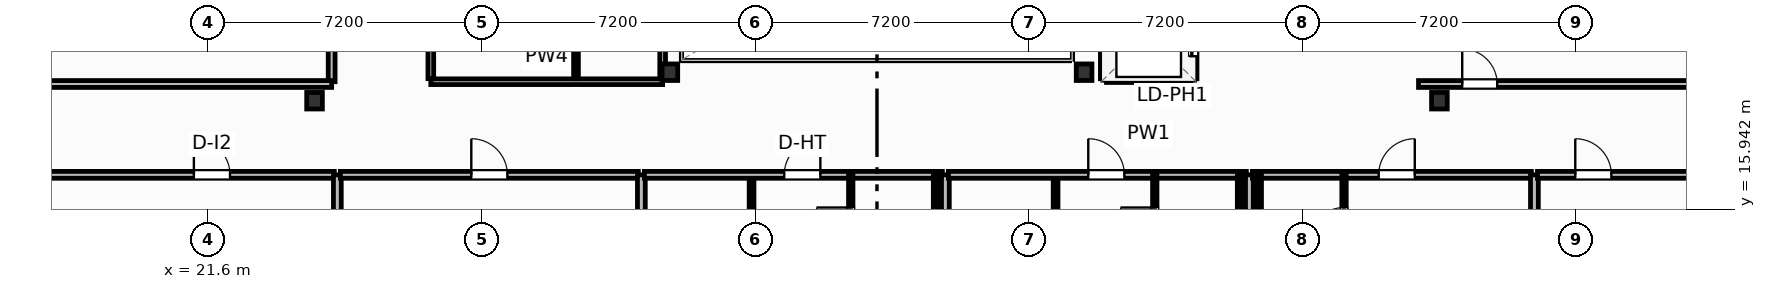
"""IFC4 building model, lengths in metres.
Left out: names, types, materials, properties, quantities, classifications, styles, units other than length and angle.
Written with IfcOpenShell. Run it as: python <this file> out.ifc"""

import sys

from ifc_helpers import new_model, si_unit, direction, frame, frame_2d, origin, origin_2d, place, context, subcontext, project, spatial, rectangle, i_section, extrude, element, fill, save


model = new_model("IFC4")
c1 = context("Model", 3, precision=1e-05, world=origin(), true_north=direction((0.0, 1.0)))
c2 = subcontext(c1, "Body", "Model", "MODEL_VIEW")
j1 = project(units=[si_unit("LENGTHUNIT", "METRE"), si_unit("PLANEANGLEUNIT", "RADIAN")], contexts=[c1])
p1 = place(None, origin())
s1 = spatial("IfcSite", under=j1, at=p1, CompositionType="ELEMENT")
p2 = place(p1, origin())
s2 = spatial("IfcBuilding", under=s1, at=p2, CompositionType="ELEMENT")
p3 = place(p2, frame((0.0, 0.0, 242.3)))
s3 = spatial("IfcBuildingStorey", under=s2, at=p3, CompositionType="ELEMENT", Elevation=242.3)
for number, where, z_axis, x_axis in (
    (1, (33.75, 19.55, 0.0), (0.0, 0.0, 1.0), (1.0, 0.0, 0.0)),
    (2, (44.65, 19.55, 0.0), (0.0, 0.0, 1.0), (1.0, 0.0, 0.0)),
    (3, (24.4, 18.8, 0.0), (0.0, 0.0, 1.0), (1.0, 0.0, 0.0)),
    (4, (54.0, 18.8, 0.0), (0.0, 0.0, 1.0), (1.0, 0.0, 0.0)),
):
    element("IfcColumn", number, at=place(p3, frame(where, z_axis=z_axis, x_axis=x_axis)), inside=s3, PredefinedType="COLUMN", context=c2, shape_type="SweptSolid", body=[
        extrude(i_section(OverallWidth=0.412, OverallDepth=0.435, WebThickness=0.036, FlangeThickness=0.057, FilletRadius=0.025, at=origin_2d()), origin(), (0.0, 0.0, 1.0), 3.7),
    ])
p4 = place(p3, frame((56.219, 9.845, 0.0), z_axis=(0.0, 0.0, 1.0), x_axis=(0.935225601791, 0.354052360188, 0.0)))
e5 = element("IfcWall", 5, at=p4, inside=s3, PredefinedType="SOLIDWALL", context=c2, shape_type="SweptSolid", body=[
    extrude(rectangle(XDim=17.647, YDim=0.22, at=frame_2d((8.824, 0.0))), origin(), (0.0, 0.0, 1.0), 2.73),
])
p5 = place(p4, frame((7.774, 0.0, 0.8)))
e6 = element("IfcOpeningElement", 6, at=p5, cuts=e5, PredefinedType="OPENING", context=c2, shape_type="SweptSolid", body=[
    extrude(rectangle(XDim=2.1, YDim=1.75, at=frame_2d((1.05, 0.875))), frame((0.0, 0.12, 0.0), z_axis=(0.0, -1.0, 0.0), x_axis=(1.0, 0.0, 0.0)), (0.0, 0.0, 1.0), 0.24),
])
p6 = place(p3, frame((7.196, 16.85, 0.0), z_axis=(0.0, 0.0, 1.0), x_axis=(1.0, 0.0, 0.0)))
e7 = element("IfcWall", 7, at=p6, inside=s3, PredefinedType="PARTITIONING", context=c2, shape_type="SweptSolid", body=[
    extrude(rectangle(XDim=17.724, YDim=0.18, at=frame_2d((8.862, 0.0))), origin(), (0.0, 0.0, 1.0), 3.45),
])
p7 = place(p6, frame((14.029, 0.0, 0.0)))
e8 = element("IfcOpeningElement", 8, at=p7, cuts=e7, PredefinedType="OPENING", context=c2, shape_type="SweptSolid", body=[
    extrude(rectangle(XDim=0.95, YDim=2.05, at=frame_2d((0.475, 1.025))), frame((0.0, 0.1, 0.0), z_axis=(0.0, -1.0, 0.0), x_axis=(1.0, 0.0, 0.0)), (0.0, 0.0, 1.0), 0.2),
])
p8 = place(p3, frame((25.0, -1.953, 0.0), z_axis=(0.0, 0.0, 1.0), x_axis=(0.0, 1.0, 0.0)))
e9 = element("IfcWall", 9, at=p8, inside=s3, PredefinedType="PARTITIONING", context=c2, shape_type="SweptSolid", body=[
    extrude(rectangle(XDim=18.803, YDim=0.205, at=frame_2d((9.402, 0.0))), origin(), (0.0, 0.0, 1.0), 2.739),
])
p9 = place(p3, frame((25.08, 16.85, 0.0), z_axis=(0.0, 0.0, 1.0), x_axis=(1.0, 0.0, 0.0)))
e10 = element("IfcWall", 10, at=p9, inside=s3, PredefinedType="PARTITIONING", context=c2, shape_type="SweptSolid", body=[
    extrude(rectangle(XDim=7.84, YDim=0.18, at=frame_2d((3.92, 0.0))), origin(), (0.0, 0.0, 1.0), 3.45),
])
p10 = place(p9, frame((3.445, 0.0, 0.0)))
e11 = element("IfcOpeningElement", 11, at=p10, cuts=e10, PredefinedType="OPENING", context=c2, shape_type="SweptSolid", body=[
    extrude(rectangle(XDim=0.95, YDim=2.05, at=frame_2d((0.475, 1.025))), frame((0.0, 0.1, 0.0), z_axis=(0.0, -1.0, 0.0), x_axis=(1.0, 0.0, 0.0)), (0.0, 0.0, 1.0), 0.2),
])
p11 = place(p3, frame((33.0, 1.076, 0.0), z_axis=(0.0, 0.0, 1.0), x_axis=(0.0, 1.0, 0.0)))
e12 = element("IfcWall", 12, at=p11, inside=s3, PredefinedType="PARTITIONING", context=c2, shape_type="SweptSolid", body=[
    extrude(rectangle(XDim=15.774, YDim=0.205, at=frame_2d((7.887, 0.0))), origin(), (0.0, 0.0, 1.0), 3.45),
])
p12 = place(p3, frame((35.9, 2.174, 0.0), z_axis=(0.0, 0.0, 1.0), x_axis=(0.0, 1.0, 0.0)))
e13 = element("IfcWall", 13, at=p12, inside=s3, PredefinedType="PARTITIONING", context=c2, shape_type="SweptSolid", body=[
    extrude(rectangle(XDim=14.677, YDim=0.125, at=frame_2d((7.338, 0.0))), origin(), (0.0, 0.0, 1.0), 2.739),
])
p13 = place(p12, frame((3.752, 0.0, 0.0)))
e14 = element("IfcOpeningElement", 14, at=p13, cuts=e13, PredefinedType="OPENING", context=c2, shape_type="SweptSolid", body=[
    extrude(rectangle(XDim=0.92, YDim=2.05, at=frame_2d((0.46, 1.025))), frame((0.0, 0.073, 0.0), z_axis=(0.0, -1.0, 0.0), x_axis=(1.0, 0.0, 0.0)), (0.0, 0.0, 1.0), 0.145),
])
p14 = place(p3, frame((33.08, 16.85, 0.0), z_axis=(0.0, 0.0, 1.0), x_axis=(1.0, 0.0, 0.0)))
e15 = element("IfcWall", 15, at=p14, inside=s3, PredefinedType="PARTITIONING", context=c2, shape_type="SweptSolid", body=[
    extrude(rectangle(XDim=7.84, YDim=0.18, at=frame_2d((3.92, 0.0))), origin(), (0.0, 0.0, 1.0), 3.45),
])
p15 = place(p14, frame((3.68, 0.0, 0.0)))
e16 = element("IfcOpeningElement", 16, at=p15, cuts=e15, PredefinedType="OPENING", context=c2, shape_type="SweptSolid", body=[
    extrude(rectangle(XDim=0.95, YDim=2.15, at=frame_2d((0.475, 1.075))), frame((0.0, 0.1, 0.0), z_axis=(0.0, -1.0, 0.0), x_axis=(1.0, 0.0, 0.0)), (0.0, 0.0, 1.0), 0.2),
])
p16 = place(p3, frame((38.51, 14.33, 0.0), z_axis=(0.0, 0.0, 1.0), x_axis=(0.0, 1.0, 0.0)))
e17 = element("IfcWall", 17, at=p16, inside=s3, PredefinedType="PARTITIONING", context=c2, shape_type="SweptSolid", body=[
    extrude(rectangle(XDim=2.52, YDim=0.115, at=frame_2d((1.26, 0.0))), origin(), (0.0, 0.0, 1.0), 3.45),
])
p17 = place(p16, frame((0.76, 0.0, 0.0)))
e18 = element("IfcOpeningElement", 18, at=p17, cuts=e17, PredefinedType="OPENING", context=c2, shape_type="SweptSolid", body=[
    extrude(rectangle(XDim=0.9, YDim=2.05, at=frame_2d((0.45, 1.025))), frame((0.0, 0.067, 0.0), z_axis=(0.0, -1.0, 0.0), x_axis=(1.0, 0.0, 0.0)), (0.0, 0.0, 1.0), 0.135),
])
p18 = place(p3, frame((40.74, 14.33, 0.0), z_axis=(0.0, 0.0, 1.0), x_axis=(0.0, 1.0, 0.0)))
e19 = element("IfcWall", 19, at=p18, inside=s3, PredefinedType="PARTITIONING", context=c2, shape_type="SweptSolid", body=[
    extrude(rectangle(XDim=2.52, YDim=0.115, at=frame_2d((1.26, 0.0))), origin(), (0.0, 0.0, 1.0), 3.45),
])
p19 = place(p3, frame((41.0, 6.35, 0.0), z_axis=(0.0, 0.0, 1.0), x_axis=(0.0, 1.0, 0.0)))
e20 = element("IfcWall", 20, at=p19, inside=s3, PredefinedType="PARTITIONING", context=c2, shape_type="SweptSolid", body=[
    extrude(rectangle(XDim=10.5, YDim=0.205, at=frame_2d((5.25, 0.0))), origin(), (0.0, 0.0, 1.0), 3.45),
])
p20 = place(p3, frame((43.9, 5.202, 0.0), z_axis=(0.0, 0.0, 1.0), x_axis=(0.0, 1.0, 0.0)))
e21 = element("IfcWall", 21, at=p20, inside=s3, PredefinedType="PARTITIONING", context=c2, shape_type="SweptSolid", body=[
    extrude(rectangle(XDim=11.648, YDim=0.125, at=frame_2d((5.824, 0.0))), origin(), (0.0, 0.0, 1.0), 3.45),
])
p21 = place(p20, frame((1.61, 0.0, 0.0)))
e22 = element("IfcOpeningElement", 22, at=p21, cuts=e21, PredefinedType="OPENING", context=c2, shape_type="SweptSolid", body=[
    extrude(rectangle(XDim=0.92, YDim=2.05, at=frame_2d((0.46, 1.025))), frame((0.0, 0.073, 0.0), z_axis=(0.0, -1.0, 0.0), x_axis=(1.0, 0.0, 0.0)), (0.0, 0.0, 1.0), 0.145),
])
p22 = place(p3, frame((41.08, 16.85, 0.0), z_axis=(0.0, 0.0, 1.0), x_axis=(1.0, 0.0, 0.0)))
e23 = element("IfcWall", 23, at=p22, inside=s3, PredefinedType="PARTITIONING", context=c2, shape_type="SweptSolid", body=[
    extrude(rectangle(XDim=7.84, YDim=0.18, at=frame_2d((3.92, 0.0))), origin(), (0.0, 0.0, 1.0), 3.45),
])
p23 = place(p22, frame((3.68, 0.0, 0.0)))
e24 = element("IfcOpeningElement", 24, at=p23, cuts=e23, PredefinedType="OPENING", context=c2, shape_type="SweptSolid", body=[
    extrude(rectangle(XDim=0.95, YDim=2.15, at=frame_2d((0.475, 1.075))), frame((0.0, 0.1, 0.0), z_axis=(0.0, -1.0, 0.0), x_axis=(1.0, 0.0, 0.0)), (0.0, 0.0, 1.0), 0.2),
])
p24 = place(p3, frame((46.51, 14.33, 0.0), z_axis=(0.0, 0.0, 1.0), x_axis=(0.0, 1.0, 0.0)))
e25 = element("IfcWall", 25, at=p24, inside=s3, PredefinedType="PARTITIONING", context=c2, shape_type="SweptSolid", body=[
    extrude(rectangle(XDim=2.52, YDim=0.115, at=frame_2d((1.26, 0.0))), origin(), (0.0, 0.0, 1.0), 3.45),
])
p25 = place(p24, frame((0.76, 0.0, 0.0)))
e26 = element("IfcOpeningElement", 26, at=p25, cuts=e25, PredefinedType="OPENING", context=c2, shape_type="SweptSolid", body=[
    extrude(rectangle(XDim=0.9, YDim=2.05, at=frame_2d((0.45, 1.025))), frame((0.0, 0.067, 0.0), z_axis=(0.0, -1.0, 0.0), x_axis=(1.0, 0.0, 0.0)), (0.0, 0.0, 1.0), 0.135),
])
p26 = place(p3, frame((48.74, 14.33, 0.0), z_axis=(0.0, 0.0, 1.0), x_axis=(0.0, 1.0, 0.0)))
e27 = element("IfcWall", 27, at=p26, inside=s3, PredefinedType="PARTITIONING", context=c2, shape_type="SweptSolid", body=[
    extrude(rectangle(XDim=2.52, YDim=0.115, at=frame_2d((1.26, 0.0))), origin(), (0.0, 0.0, 1.0), 3.45),
])
p27 = place(p3, frame((49.0, 7.133, 0.0), z_axis=(0.0, 0.0, 1.0), x_axis=(0.0, 1.0, 0.0)))
e28 = element("IfcWall", 28, at=p27, inside=s3, PredefinedType="PARTITIONING", context=c2, shape_type="SweptSolid", body=[
    extrude(rectangle(XDim=9.717, YDim=0.205, at=frame_2d((4.858, 0.0))), origin(), (0.0, 0.0, 1.0), 3.45),
])
p28 = place(p3, frame((49.08, 16.85, 0.0), z_axis=(0.0, 0.0, 1.0), x_axis=(1.0, 0.0, 0.0)))
e29 = element("IfcWall", 29, at=p28, inside=s3, PredefinedType="PARTITIONING", context=c2, shape_type="SweptSolid", body=[
    extrude(rectangle(XDim=7.34, YDim=0.18, at=frame_2d((3.67, 0.0))), origin(), (0.0, 0.0, 1.0), 3.45),
])
p29 = place(p28, frame((3.322, 0.0, 0.0)))
e30 = element("IfcOpeningElement", 30, at=p29, cuts=e29, PredefinedType="OPENING", context=c2, shape_type="SweptSolid", body=[
    extrude(rectangle(XDim=0.95, YDim=2.15, at=frame_2d((0.475, 1.075))), frame((0.0, 0.1, 0.0), z_axis=(0.0, -1.0, 0.0), x_axis=(1.0, 0.0, 0.0)), (0.0, 0.0, 1.0), 0.2),
])
p30 = place(p3, frame((51.49, 14.33, 0.0), z_axis=(0.0, 0.0, 1.0), x_axis=(0.0, 1.0, 0.0)))
e31 = element("IfcWall", 31, at=p30, inside=s3, PredefinedType="PARTITIONING", context=c2, shape_type="SweptSolid", body=[
    extrude(rectangle(XDim=2.52, YDim=0.115, at=frame_2d((1.26, 0.0))), origin(), (0.0, 0.0, 1.0), 3.45),
])
p31 = place(p30, frame((0.76, 0.0, 0.0)))
e32 = element("IfcOpeningElement", 32, at=p31, cuts=e31, PredefinedType="OPENING", context=c2, shape_type="SweptSolid", body=[
    extrude(rectangle(XDim=0.9, YDim=2.05, at=frame_2d((0.45, 1.025))), frame((0.0, 0.067, 0.0), z_axis=(0.0, -1.0, 0.0), x_axis=(1.0, 0.0, 0.0)), (0.0, 0.0, 1.0), 0.135),
])
p32 = place(p3, frame((49.26, 14.33, 0.0), z_axis=(0.0, 0.0, 1.0), x_axis=(0.0, 1.0, 0.0)))
e33 = element("IfcWall", 33, at=p32, inside=s3, PredefinedType="PARTITIONING", context=c2, shape_type="SweptSolid", body=[
    extrude(rectangle(XDim=2.52, YDim=0.115, at=frame_2d((1.26, 0.0))), origin(), (0.0, 0.0, 1.0), 3.45),
])
p33 = place(p3, frame((56.5, 9.972, 0.0), z_axis=(0.0, 0.0, 1.0), x_axis=(0.0, 1.0, 0.0)))
e34 = element("IfcWall", 34, at=p33, inside=s3, PredefinedType="PARTITIONING", context=c2, shape_type="SweptSolid", body=[
    extrude(rectangle(XDim=6.878, YDim=0.205, at=frame_2d((3.439, 0.0))), origin(), (0.0, 0.0, 1.0), 3.45),
])
p34 = place(p3, frame((56.58, 16.85, 0.0), z_axis=(0.0, 0.0, 1.0), x_axis=(1.0, 0.0, 0.0)))
e35 = element("IfcWall", 35, at=p34, inside=s3, PredefinedType="PARTITIONING", context=c2, shape_type="SweptSolid", body=[
    extrude(rectangle(XDim=17.404, YDim=0.18, at=frame_2d((8.702, 0.0))), origin(), (0.0, 0.0, 1.0), 3.45),
])
p35 = place(p34, frame((0.995, 0.0, 0.0)))
e36 = element("IfcOpeningElement", 36, at=p35, cuts=e35, PredefinedType="OPENING", context=c2, shape_type="SweptSolid", body=[
    extrude(rectangle(XDim=0.95, YDim=2.05, at=frame_2d((0.475, 1.025))), frame((0.0, 0.1, 0.0), z_axis=(0.0, -1.0, 0.0), x_axis=(1.0, 0.0, 0.0)), (0.0, 0.0, 1.0), 0.2),
])
p36 = place(p3, frame((24.85, 19.3, 0.0), z_axis=(0.0, 0.0, 1.0), x_axis=(0.0, 1.0, 0.0)))
e37 = element("IfcWall", 37, at=p36, inside=s3, PredefinedType="PARTITIONING", context=c2, shape_type="SweptSolid", body=[
    extrude(rectangle(XDim=3.57, YDim=0.18, at=frame_2d((1.785, 0.0))), origin(), (0.0, 0.0, 1.0), 3.45),
])
p37 = place(p36, frame((1.5, 0.0, 0.0)))
e38 = element("IfcOpeningElement", 38, at=p37, cuts=e37, PredefinedType="OPENING", context=c2, shape_type="SweptSolid", body=[
    extrude(rectangle(XDim=0.92, YDim=2.05, at=frame_2d((0.46, 1.025))), frame((0.0, 0.1, 0.0), z_axis=(0.0, -1.0, 0.0), x_axis=(1.0, 0.0, 0.0)), (0.0, 0.0, 1.0), 0.2),
])
p38 = place(p3, frame((6.291, 19.24, 0.0), z_axis=(0.0, 0.0, 1.0), x_axis=(1.0, 0.0, 0.0)))
e39 = element("IfcWall", 39, at=p38, inside=s3, PredefinedType="PARTITIONING", context=c2, shape_type="SweptSolid", body=[
    extrude(rectangle(XDim=18.559, YDim=0.18, at=frame_2d((9.279, 0.0))), origin(), (0.0, 0.0, 1.0), 3.45),
])
p39 = place(p3, frame((53.45, 19.24, 0.0), z_axis=(0.0, 0.0, 1.0), x_axis=(1.0, 0.0, 0.0)))
e40 = element("IfcWall", 40, at=p39, inside=s3, PredefinedType="PARTITIONING", context=c2, shape_type="SweptSolid", body=[
    extrude(rectangle(XDim=22.156, YDim=0.18, at=frame_2d((11.078, 0.0))), origin(), (0.0, 0.0, 1.0), 3.45),
])
p40 = place(p39, frame((1.15, 0.0, 0.0)))
e41 = element("IfcOpeningElement", 41, at=p40, cuts=e40, PredefinedType="OPENING", context=c2, shape_type="SweptSolid", body=[
    extrude(rectangle(XDim=0.92, YDim=2.05, at=frame_2d((0.46, 1.025))), frame((0.0, 0.1, 0.0), z_axis=(0.0, -1.0, 0.0), x_axis=(1.0, 0.0, 0.0)), (0.0, 0.0, 1.0), 0.2),
])
p41 = place(p3, frame((27.46, 19.3, 0.0), z_axis=(0.0, 0.0, 1.0), x_axis=(1.0, 0.0, 0.0)))
e42 = element("IfcWall", 42, at=p41, inside=s3, PredefinedType="PARTITIONING", context=c2, shape_type="SweptSolid", body=[
    extrude(rectangle(XDim=6.1, YDim=0.15, at=frame_2d((3.05, 0.0))), origin(), (0.0, 0.0, 1.0), 2.662),
])
p42 = place(p3, frame((31.28, 19.38, 0.0), z_axis=(0.0, 0.0, 1.0), x_axis=(0.0, 1.0, 0.0)))
e43 = element("IfcWall", 43, at=p42, inside=s3, PredefinedType="PARTITIONING", context=c2, shape_type="SweptSolid", body=[
    extrude(rectangle(XDim=7.16, YDim=0.125, at=frame_2d((3.58, 0.0))), origin(), (0.0, 0.0, 1.0), 3.45),
])
p43 = place(p3, frame((27.46, 19.38, 0.0), z_axis=(0.0, 0.0, 1.0), x_axis=(0.0, 1.0, 0.0)))
e44 = element("IfcWall", 44, at=p43, inside=s3, PredefinedType="PARTITIONING", context=c2, shape_type="SweptSolid", body=[
    extrude(rectangle(XDim=7.16, YDim=0.15, at=frame_2d((3.58, 0.0))), origin(), (0.0, 0.0, 1.0), 3.45),
])
p44 = place(p43, frame((1.4, 0.0, 0.0)))
e45 = element("IfcOpeningElement", 45, at=p44, cuts=e44, PredefinedType="OPENING", context=c2, shape_type="SweptSolid", body=[
    extrude(rectangle(XDim=0.95, YDim=2.05, at=frame_2d((0.475, 1.025))), frame((0.0, 0.085, 0.0), z_axis=(0.0, -1.0, 0.0), x_axis=(1.0, 0.0, 0.0)), (0.0, 0.0, 1.0), 0.17),
])
p45 = place(p3, frame((33.56, 19.38, 0.0), z_axis=(0.0, 0.0, 1.0), x_axis=(0.0, 1.0, 0.0)))
e46 = element("IfcWall", 46, at=p45, inside=s3, PredefinedType="PARTITIONING", context=c2, shape_type="SweptSolid", body=[
    extrude(rectangle(XDim=7.16, YDim=0.15, at=frame_2d((3.58, 0.0))), origin(), (0.0, 0.0, 1.0), 2.824),
])
p46 = place(p3, frame((45.24, 19.38, 0.0), z_axis=(0.0, 0.0, 1.0), x_axis=(1.0, 0.0, 0.0)))
e47 = element("IfcWall", 47, at=p46, inside=s3, PredefinedType="PARTITIONING", context=c2, shape_type="SweptSolid", body=[
    extrude(rectangle(XDim=2.22, YDim=0.2, at=frame_2d((1.11, 0.0))), origin(), (0.0, 0.0, 1.0), 2.662),
])
p47 = place(p3, frame((45.18, 19.38, 0.0), z_axis=(0.0, 0.0, 1.0), x_axis=(0.0, 1.0, 0.0)))
e48 = element("IfcWall", 48, at=p47, inside=s3, PredefinedType="PARTITIONING", context=c2, shape_type="SweptSolid", body=[
    extrude(rectangle(XDim=6.9, YDim=0.2, at=frame_2d((3.45, 0.0))), origin(), (0.0, 0.0, 1.0), 3.45),
])
p48 = place(p3, frame((47.52, 19.38, 0.0), z_axis=(0.0, 0.0, 1.0), x_axis=(0.0, 1.0, 0.0)))
e49 = element("IfcWall", 49, at=p48, inside=s3, PredefinedType="PARTITIONING", context=c2, shape_type="SweptSolid", body=[
    extrude(rectangle(XDim=6.9, YDim=0.2, at=frame_2d((3.45, 0.0))), origin(), (0.0, 0.0, 1.0), 3.45),
])
p49 = place(p48, frame((0.59, 0.0, 0.0)))
e50 = element("IfcOpeningElement", 50, at=p49, cuts=e49, PredefinedType="OPENING", context=c2, shape_type="SweptSolid", body=[
    extrude(rectangle(XDim=1.1, YDim=2.15, at=frame_2d((0.55, 1.075))), frame((0.0, 0.11, 0.0), z_axis=(0.0, -1.0, 0.0), x_axis=(1.0, 0.0, 0.0)), (0.0, 0.0, 1.0), 0.22),
])
p50 = place(p48, frame((2.89, 0.0, 0.0)))
e51 = element("IfcOpeningElement", 51, at=p50, cuts=e49, PredefinedType="OPENING", context=c2, shape_type="SweptSolid", body=[
    extrude(rectangle(XDim=1.1, YDim=2.15, at=frame_2d((0.55, 1.075))), frame((0.0, 0.11, 0.0), z_axis=(0.0, -1.0, 0.0), x_axis=(1.0, 0.0, 0.0)), (0.0, 0.0, 1.0), 0.22),
])
p51 = place(p48, frame((5.19, 0.0, 0.0)))
e52 = element("IfcOpeningElement", 52, at=p51, cuts=e49, PredefinedType="OPENING", context=c2, shape_type="SweptSolid", body=[
    extrude(rectangle(XDim=1.1, YDim=2.15, at=frame_2d((0.55, 1.075))), frame((0.0, 0.11, 0.0), z_axis=(0.0, -1.0, 0.0), x_axis=(1.0, 0.0, 0.0)), (0.0, 0.0, 1.0), 0.22),
])
p52 = place(p7, origin())
e53 = element("IfcDoor", 53, at=p52, inside=s3, OperationType="SINGLE_SWING_LEFT", PredefinedType="DOOR", context=c2, shape_type="SweptSolid", body=[
    extrude(rectangle(XDim=0.95, YDim=2.05, at=frame_2d((0.475, 1.025))), frame((0.0, 0.025, 0.0), z_axis=(0.0, -1.0, 0.0), x_axis=(1.0, 0.0, 0.0)), (0.0, 0.0, 1.0), 0.05),
])
fill(e8, e53)
p53 = place(p10, origin())
e54 = element("IfcDoor", 54, at=p53, inside=s3, OperationType="SINGLE_SWING_LEFT", PredefinedType="DOOR", context=c2, shape_type="SweptSolid", body=[
    extrude(rectangle(XDim=0.95, YDim=2.05, at=frame_2d((0.475, 1.025))), frame((0.0, 0.025, 0.0), z_axis=(0.0, -1.0, 0.0), x_axis=(1.0, 0.0, 0.0)), (0.0, 0.0, 1.0), 0.05),
])
fill(e11, e54)
p54 = place(p15, origin())
e55 = element("IfcDoor", 55, at=p54, inside=s3, OperationType="SINGLE_SWING_RIGHT", PredefinedType="DOOR", context=c2, shape_type="SweptSolid", body=[
    extrude(rectangle(XDim=0.95, YDim=2.15, at=frame_2d((0.475, 1.075))), frame((0.0, 0.025, 0.0), z_axis=(0.0, -1.0, 0.0), x_axis=(1.0, 0.0, 0.0)), (0.0, 0.0, 1.0), 0.05),
])
fill(e16, e55)
p55 = place(p17, origin())
e56 = element("IfcDoor", 56, at=p55, inside=s3, OperationType="SINGLE_SWING_RIGHT", PredefinedType="DOOR", context=c2, shape_type="SweptSolid", body=[
    extrude(rectangle(XDim=0.9, YDim=2.05, at=frame_2d((0.45, 1.025))), frame((0.0, 0.025, 0.0), z_axis=(0.0, -1.0, 0.0), x_axis=(1.0, 0.0, 0.0)), (0.0, 0.0, 1.0), 0.05),
])
fill(e18, e56)
p56 = place(p23, origin())
e57 = element("IfcDoor", 57, at=p56, inside=s3, OperationType="SINGLE_SWING_LEFT", PredefinedType="DOOR", context=c2, shape_type="SweptSolid", body=[
    extrude(rectangle(XDim=0.95, YDim=2.15, at=frame_2d((0.475, 1.075))), frame((0.0, 0.025, 0.0), z_axis=(0.0, -1.0, 0.0), x_axis=(1.0, 0.0, 0.0)), (0.0, 0.0, 1.0), 0.05),
])
fill(e24, e57)
p57 = place(p25, origin())
e58 = element("IfcDoor", 58, at=p57, inside=s3, OperationType="SINGLE_SWING_RIGHT", PredefinedType="DOOR", context=c2, shape_type="SweptSolid", body=[
    extrude(rectangle(XDim=0.9, YDim=2.05, at=frame_2d((0.45, 1.025))), frame((0.0, 0.025, 0.0), z_axis=(0.0, -1.0, 0.0), x_axis=(1.0, 0.0, 0.0)), (0.0, 0.0, 1.0), 0.05),
])
fill(e26, e58)
p58 = place(p29, origin())
e59 = element("IfcDoor", 59, at=p58, inside=s3, OperationType="SINGLE_SWING_RIGHT", PredefinedType="DOOR", context=c2, shape_type="SweptSolid", body=[
    extrude(rectangle(XDim=0.95, YDim=2.15, at=frame_2d((0.475, 1.075))), frame((0.0, 0.025, 0.0), z_axis=(0.0, -1.0, 0.0), x_axis=(1.0, 0.0, 0.0)), (0.0, 0.0, 1.0), 0.05),
])
fill(e30, e59)
p59 = place(p31, origin())
e60 = element("IfcDoor", 60, at=p59, inside=s3, OperationType="SINGLE_SWING_LEFT", PredefinedType="DOOR", context=c2, shape_type="SweptSolid", body=[
    extrude(rectangle(XDim=0.9, YDim=2.05, at=frame_2d((0.45, 1.025))), frame((0.0, 0.025, 0.0), z_axis=(0.0, -1.0, 0.0), x_axis=(1.0, 0.0, 0.0)), (0.0, 0.0, 1.0), 0.05),
])
fill(e32, e60)
p60 = place(p35, origin())
e61 = element("IfcDoor", 61, at=p60, inside=s3, OperationType="SINGLE_SWING_LEFT", PredefinedType="DOOR", context=c2, shape_type="SweptSolid", body=[
    extrude(rectangle(XDim=0.95, YDim=2.05, at=frame_2d((0.475, 1.025))), frame((0.0, 0.025, 0.0), z_axis=(0.0, -1.0, 0.0), x_axis=(1.0, 0.0, 0.0)), (0.0, 0.0, 1.0), 0.05),
])
fill(e36, e61)
p61 = place(p40, origin())
e62 = element("IfcDoor", 62, at=p61, inside=s3, OperationType="SINGLE_SWING_LEFT", PredefinedType="DOOR", context=c2, shape_type="SweptSolid", body=[
    extrude(rectangle(XDim=0.92, YDim=2.05, at=frame_2d((0.46, 1.025))), frame((0.0, 0.025, 0.0), z_axis=(0.0, -1.0, 0.0), x_axis=(1.0, 0.0, 0.0)), (0.0, 0.0, 1.0), 0.05),
])
fill(e41, e62)
p62 = place(p49, origin())
e63 = element("IfcDoor", 63, at=p62, inside=s3, OperationType="SLIDING_TO_LEFT", PredefinedType="DOOR", context=c2, shape_type="SweptSolid", body=[
    extrude(rectangle(XDim=1.1, YDim=2.15, at=frame_2d((0.55, 1.075))), frame((0.0, 0.025, 0.0), z_axis=(0.0, -1.0, 0.0), x_axis=(1.0, 0.0, 0.0)), (0.0, 0.0, 1.0), 0.05),
])
fill(e50, e63)
save(model, sys.argv[1])
